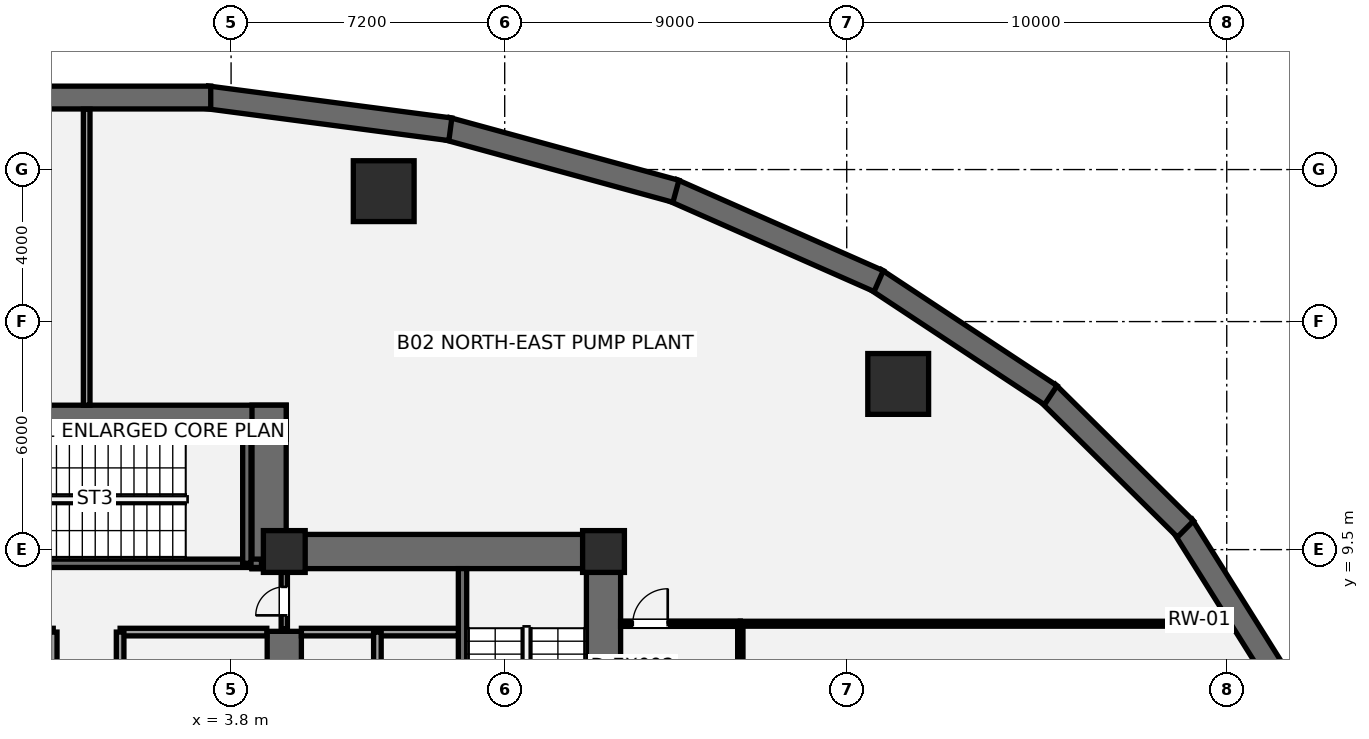
"""IFC4 building model, lengths in metres.
Left out: names, types, materials, properties, quantities, classifications, styles, units other than length and angle.
Written with IfcOpenShell. Run it as: python <this file> out.ifc"""

import sys

from ifc_helpers import new_model, si_unit, direction, frame, frame_2d, origin, origin_2d, place, context, subcontext, project, spatial, rectangle, hollow_circle, extrude, element, fill, save


model = new_model("IFC4")
c1 = context("Model", 3, precision=1e-05, world=origin(), true_north=direction((0.0, 1.0)))
c2 = subcontext(c1, "Body", "Model", "MODEL_VIEW")
j1 = project(units=[si_unit("LENGTHUNIT", "METRE"), si_unit("PLANEANGLEUNIT", "RADIAN")], contexts=[c1])
p1 = place(None, origin())
s1 = spatial("IfcSite", under=j1, at=p1, CompositionType="ELEMENT")
p2 = place(p1, origin())
s2 = spatial("IfcBuilding", under=s1, at=p2, CompositionType="ELEMENT")
p3 = place(p2, frame((0.0, 0.0, -8.8)))
s3 = spatial("IfcBuildingStorey", under=s2, at=p3, CompositionType="ELEMENT", Elevation=-8.8)
p4 = place(p3, frame((31.341, 6.143, 0.0), z_axis=(0.0, 0.0, 1.0), x_axis=(-0.531244363113, 0.847218641592, 0.0)))
e1 = element("IfcWall", 1, at=p4, inside=s3, PredefinedType="USERDEFINED", context=c2, shape_type="SweptSolid", body=[
    extrude(rectangle(XDim=4.72, YDim=0.6, at=frame_2d((2.36, 0.0))), origin(), (0.0, 0.0, 1.0), 4.4),
])
p5 = place(p3, frame((28.914, 10.042, 0.0), z_axis=(0.0, 0.0, 1.0), x_axis=(-0.711105403666, 0.70308541791, 0.0)))
e2 = element("IfcWall", 2, at=p5, inside=s3, PredefinedType="USERDEFINED", context=c2, shape_type="SweptSolid", body=[
    extrude(rectangle(XDim=5.114, YDim=0.6, at=frame_2d((2.557, 0.0))), origin(), (0.0, 0.0, 1.0), 4.4),
])
p6 = place(p3, frame((25.369, 13.563, 0.0), z_axis=(0.0, 0.0, 1.0), x_axis=(-0.834367518908, 0.551208529861, 0.0)))
e3 = element("IfcWall", 3, at=p6, inside=s3, PredefinedType="USERDEFINED", context=c2, shape_type="SweptSolid", body=[
    extrude(rectangle(XDim=5.542, YDim=0.6, at=frame_2d((2.771, 0.0))), origin(), (0.0, 0.0, 1.0), 4.4),
])
p7 = place(p3, frame((20.841, 16.565, 0.0), z_axis=(0.0, 0.0, 1.0), x_axis=(-0.91483072277, 0.403837527574, 0.0)))
e4 = element("IfcWall", 4, at=p7, inside=s3, PredefinedType="USERDEFINED", context=c2, shape_type="SweptSolid", body=[
    extrude(rectangle(XDim=5.94, YDim=0.6, at=frame_2d((2.97, 0.0))), origin(), (0.0, 0.0, 1.0), 4.4),
])
p8 = place(p3, frame((15.506, 18.929, 0.0), z_axis=(0.0, 0.0, 1.0), x_axis=(-0.964548276597, 0.263906464707, 0.0)))
e5 = element("IfcWall", 5, at=p8, inside=s3, PredefinedType="USERDEFINED", context=c2, shape_type="SweptSolid", body=[
    extrude(rectangle(XDim=6.257, YDim=0.6, at=frame_2d((3.128, 0.0))), origin(), (0.0, 0.0, 1.0), 4.4),
])
p9 = place(p3, frame((9.57, 20.56, 0.0), z_axis=(0.0, 0.0, 1.0), x_axis=(-0.991471782517, 0.130321542624, 0.0)))
e6 = element("IfcWall", 6, at=p9, inside=s3, PredefinedType="USERDEFINED", context=c2, shape_type="SweptSolid", body=[
    extrude(rectangle(XDim=6.459, YDim=0.6, at=frame_2d((3.23, 0.0))), origin(), (0.0, 0.0, 1.0), 4.4),
])
p10 = place(p3, frame((3.265, 21.395, 0.0), z_axis=(0.0, 0.0, 1.0), x_axis=(-1.0, 0.0, 0.0)))
e7 = element("IfcWall", 7, at=p10, inside=s3, PredefinedType="USERDEFINED", context=c2, shape_type="SweptSolid", body=[
    extrude(rectangle(XDim=6.529, YDim=0.6, at=frame_2d((3.265, 0.0))), origin(), (0.0, 0.0, 1.0), 4.4),
])
p11 = place(p3, frame((13.6, 0.95, 0.0), z_axis=(0.0, 0.0, 1.0), x_axis=(0.0, 1.0, 0.0)))
e8 = element("IfcWall", 8, at=p11, inside=s3, PredefinedType="SHEAR", context=c2, shape_type="SweptSolid", body=[
    extrude(rectangle(XDim=8.95, YDim=0.9, at=frame_2d((4.475, 0.0))), origin(), (0.0, 0.0, 1.0), 4.4),
])
p12 = place(p3, frame((4.35, 9.45, 0.0), z_axis=(0.0, 0.0, 1.0), x_axis=(1.0, 0.0, 0.0)))
e9 = element("IfcWall", 9, at=p12, inside=s3, PredefinedType="SHEAR", context=c2, shape_type="SweptSolid", body=[
    extrude(rectangle(XDim=9.7, YDim=0.9, at=frame_2d((4.85, 0.0))), origin(), (0.0, 0.0, 1.0), 4.4),
])
p13 = place(p3, frame((5.2, 5.35, 0.0), z_axis=(0.0, 0.0, 1.0), x_axis=(0.0, 1.0, 0.0)))
e10 = element("IfcWall", 10, at=p13, inside=s3, PredefinedType="SHEAR", context=c2, shape_type="SweptSolid", body=[
    extrude(rectangle(XDim=2.0, YDim=0.9, at=frame_2d((1.0, 0.0))), origin(), (0.0, 0.0, 1.0), 4.4),
])
p14 = place(p3, frame((9.89, 1.85, 0.0), z_axis=(0.0, 0.0, 1.0), x_axis=(0.0, 1.0, 0.0)))
e11 = element("IfcWall", 11, at=p14, inside=s3, PredefinedType="SHEAR", context=c2, shape_type="SweptSolid", body=[
    extrude(rectangle(XDim=7.15, YDim=0.22, at=frame_2d((3.575, 0.0))), origin(), (0.0, 0.0, 1.0), 4.4),
])
p15 = place(p3, frame((-5.25, 12.85, 0.0), z_axis=(0.0, 0.0, 1.0), x_axis=(1.0, 0.0, 0.0)))
e12 = element("IfcWall", 12, at=p15, inside=s3, PredefinedType="SHEAR", context=c2, shape_type="SweptSolid", body=[
    extrude(rectangle(XDim=10.5, YDim=0.9, at=frame_2d((5.25, 0.0))), origin(), (0.0, 0.0, 1.0), 4.4),
])
p16 = place(p3, frame((4.8, 9.0, 0.0), z_axis=(0.0, 0.0, 1.0), x_axis=(0.0, 1.0, 0.0)))
e13 = element("IfcWall", 13, at=p16, inside=s3, PredefinedType="SHEAR", context=c2, shape_type="SweptSolid", body=[
    extrude(rectangle(XDim=4.3, YDim=0.9, at=frame_2d((2.15, 0.0))), origin(), (0.0, 0.0, 1.0), 4.4),
])
p17 = place(p3, frame((-4.7, 9.14, 0.0), z_axis=(0.0, 0.0, 1.0), x_axis=(1.0, 0.0, 0.0)))
e14 = element("IfcWall", 14, at=p17, inside=s3, PredefinedType="SHEAR", context=c2, shape_type="SweptSolid", body=[
    extrude(rectangle(XDim=9.3, YDim=0.22, at=frame_2d((4.65, 0.0))), origin(), (0.0, 0.0, 1.0), 4.4),
])
p18 = place(p17, frame((1.15, 0.0, 0.0)))
e15 = element("IfcOpeningElement", 15, at=p18, cuts=e14, PredefinedType="OPENING", context=c2, shape_type="SweptSolid", body=[
    extrude(rectangle(XDim=1.05, YDim=2.15, at=frame_2d((0.525, 1.075))), frame((0.0, 0.12, 0.0), z_axis=(0.0, -1.0, 0.0), x_axis=(1.0, 0.0, 0.0)), (0.0, 0.0, 1.0), 0.24),
])
p19 = place(p3, frame((4.215, 9.14, 0.0), z_axis=(0.0, 0.0, 1.0), x_axis=(0.0, 1.0, 0.0)))
e16 = element("IfcWall", 16, at=p19, inside=s3, PredefinedType="SHEAR", context=c2, shape_type="SweptSolid", body=[
    extrude(rectangle(XDim=3.26, YDim=0.22, at=frame_2d((1.63, 0.0))), origin(), (0.0, 0.0, 1.0), 4.4),
])
for number, where, z_axis, x_axis in (
    (17, (5.2, 9.45, 0.0), (0.0, 0.0, 1.0), (1.0, 0.0, 0.0)),
    (18, (13.6, 9.45, 0.0), (0.0, 0.0, 1.0), (1.0, 0.0, 0.0)),
):
    element("IfcColumn", number, at=place(p3, frame(where, z_axis=z_axis, x_axis=x_axis)), inside=s3, PredefinedType="COLUMN", context=c2, shape_type="SweptSolid", body=[
        extrude(rectangle(XDim=1.1, YDim=1.1, at=origin_2d()), origin(), (0.0, 0.0, 1.0), 4.4),
    ])
for number, where, z_axis, x_axis in (
    (19, (21.354, 13.859, 0.0), (0.0, 0.0, 1.0), (1.0, 0.0, 0.0)),
    (20, (7.816, 18.932, 0.0), (0.0, 0.0, 1.0), (1.0, 0.0, 0.0)),
):
    element("IfcColumn", number, at=place(p3, frame(where, z_axis=z_axis, x_axis=x_axis)), inside=s3, PredefinedType="USERDEFINED", context=c2, shape_type="SweptSolid", body=[
        extrude(hollow_circle(Radius=0.8, WallThickness=0.06, at=origin_2d()), origin(), (0.0, 0.0, 1.0), 4.4),
    ])
p20 = place(p3, frame((5.65, 7.33, 0.0), z_axis=(0.0, 0.0, 1.0), x_axis=(1.0, 0.0, 0.0)))
e21 = element("IfcWall", 21, at=p20, inside=s3, PredefinedType="SOLIDWALL", context=c2, shape_type="SweptSolid", body=[
    extrude(rectangle(XDim=4.13, YDim=0.2, at=frame_2d((2.065, 0.0))), origin(), (0.0, 0.0, 1.0), 4.14),
])
p21 = place(p3, frame((7.65, 5.47, 0.0), z_axis=(0.0, 0.0, 1.0), x_axis=(0.0, 1.0, 0.0)))
e22 = element("IfcWall", 22, at=p21, inside=s3, PredefinedType="SOLIDWALL", context=c2, shape_type="SweptSolid", body=[
    extrude(rectangle(XDim=1.86, YDim=0.2, at=frame_2d((0.93, 0.0))), origin(), (0.0, 0.0, 1.0), 4.14),
])
for number, where, z_axis, x_axis in (
    (23, (-4.74, 7.33, 0.0), (0.0, 0.0, 1.0), (1.0, 0.0, 0.0)),
    (24, (0.88, 7.33, 0.0), (0.0, 0.0, 1.0), (1.0, 0.0, 0.0)),
):
    element("IfcWall", number, at=place(p3, frame(where, z_axis=z_axis, x_axis=x_axis)), inside=s3, PredefinedType="SOLIDWALL", context=c2, shape_type="SweptSolid", body=[
        extrude(rectangle(XDim=3.86, YDim=0.2, at=frame_2d((1.93, 0.0))), origin(), (0.0, 0.0, 1.0), 4.14),
    ])
for number, where, z_axis, x_axis in (
    (25, (-0.88, 5.52, 0.0), (0.0, 0.0, 1.0), (0.0, 1.0, 0.0)),
    (26, (0.88, 5.52, 0.0), (0.0, 0.0, 1.0), (0.0, 1.0, 0.0)),
):
    element("IfcWall", number, at=place(p3, frame(where, z_axis=z_axis, x_axis=x_axis)), inside=s3, PredefinedType="SOLIDWALL", context=c2, shape_type="SweptSolid", body=[
        extrude(rectangle(XDim=1.81, YDim=0.2, at=frame_2d((0.905, 0.0))), origin(), (0.0, 0.0, 1.0), 4.14),
    ])
p22 = place(p3, frame((5.2, 7.42, 0.0), z_axis=(0.0, 0.0, 1.0), x_axis=(0.0, 1.0, 0.0)))
e27 = element("IfcWall", 27, at=p22, inside=s3, PredefinedType="PARTITIONING", context=c2, shape_type="SweptSolid", body=[
    extrude(rectangle(XDim=1.58, YDim=0.165, at=frame_2d((0.79, 0.0))), origin(), (0.0, 0.0, 1.0), 4.14),
])
p23 = place(p22, frame((0.35, 0.0, 0.0)))
e28 = element("IfcOpeningElement", 28, at=p23, cuts=e27, PredefinedType="OPENING", context=c2, shape_type="SweptSolid", body=[
    extrude(rectangle(XDim=0.75, YDim=2.1, at=frame_2d((0.375, 1.05))), frame((0.0, 0.093, 0.0), z_axis=(0.0, -1.0, 0.0), x_axis=(1.0, 0.0, 0.0)), (0.0, 0.0, 1.0), 0.185),
])
p24 = place(p3, frame((17.2, -17.836, 0.0), z_axis=(0.0, 0.0, 1.0), x_axis=(0.0, 1.0, 0.0)))
e29 = element("IfcWall", 29, at=p24, inside=s3, PredefinedType="PARTITIONING", context=c2, shape_type="SweptSolid", body=[
    extrude(rectangle(XDim=25.386, YDim=0.14, at=frame_2d((12.693, 0.0))), origin(), (0.0, 0.0, 1.0), 3.508),
])
p25 = place(p24, frame((15.036, 0.0, 0.0)))
e30 = element("IfcOpeningElement", 30, at=p25, cuts=e29, PredefinedType="OPENING", context=c2, shape_type="SweptSolid", body=[
    extrude(rectangle(XDim=0.9, YDim=2.1, at=frame_2d((0.45, 1.05))), frame((0.0, 0.08, 0.0), z_axis=(0.0, -1.0, 0.0), x_axis=(1.0, 0.0, 0.0)), (0.0, 0.0, 1.0), 0.16),
])
p26 = place(p24, frame((21.911, 0.0, 0.0)))
e31 = element("IfcOpeningElement", 31, at=p26, cuts=e29, PredefinedType="OPENING", context=c2, shape_type="SweptSolid", body=[
    extrude(rectangle(XDim=0.9, YDim=2.1, at=frame_2d((0.45, 1.05))), frame((0.0, 0.08, 0.0), z_axis=(0.0, -1.0, 0.0), x_axis=(1.0, 0.0, 0.0)), (0.0, 0.0, 1.0), 0.16),
])
p27 = place(p3, frame((14.05, 7.55, 0.0), z_axis=(0.0, 0.0, 1.0), x_axis=(1.0, 0.0, 0.0)))
e32 = element("IfcWall", 32, at=p27, inside=s3, PredefinedType="PARTITIONING", context=c2, shape_type="SweptSolid", body=[
    extrude(rectangle(XDim=3.15, YDim=0.14, at=frame_2d((1.575, 0.0))), origin(), (0.0, 0.0, 1.0), 4.14),
])
p28 = place(p27, frame((0.32, 0.0, 0.0)))
e33 = element("IfcOpeningElement", 33, at=p28, cuts=e32, PredefinedType="OPENING", context=c2, shape_type="SweptSolid", body=[
    extrude(rectangle(XDim=0.92, YDim=2.15, at=frame_2d((0.46, 1.075))), frame((0.0, 0.08, 0.0), z_axis=(0.0, -1.0, 0.0), x_axis=(1.0, 0.0, 0.0)), (0.0, 0.0, 1.0), 0.16),
])
p29 = place(p3, frame((0.0, 13.3, 0.0), z_axis=(0.0, 0.0, 1.0), x_axis=(0.0, 1.0, 0.0)))
e34 = element("IfcWall", 34, at=p29, inside=s3, PredefinedType="PARTITIONING", context=c2, shape_type="SweptSolid", body=[
    extrude(rectangle(XDim=7.787, YDim=0.175, at=frame_2d((3.894, 0.0))), origin(), (0.0, 0.0, 1.0), 4.14),
])
p30 = place(p3, frame((17.2, 7.55, 0.0), z_axis=(0.0, 0.0, 1.0), x_axis=(1.0, 0.0, 0.0)))
e35 = element("IfcWall", 35, at=p30, inside=s3, PredefinedType="PARTITIONING", context=c2, shape_type="SweptSolid", body=[
    extrude(rectangle(XDim=12.895, YDim=0.13, at=frame_2d((6.448, 0.0))), origin(), (0.0, 0.0, 1.0), 3.118),
])
p31 = place(p23, origin())
e36 = element("IfcDoor", 36, at=p31, inside=s3, OperationType="SINGLE_SWING_LEFT", PredefinedType="DOOR", context=c2, shape_type="SweptSolid", body=[
    extrude(rectangle(XDim=0.75, YDim=2.1, at=frame_2d((0.375, 1.05))), frame((0.0, 0.025, 0.0), z_axis=(0.0, -1.0, 0.0), x_axis=(1.0, 0.0, 0.0)), (0.0, 0.0, 1.0), 0.05),
])
fill(e28, e36)
p32 = place(p28, origin())
e37 = element("IfcDoor", 37, at=p32, inside=s3, OperationType="SINGLE_SWING_RIGHT", PredefinedType="DOOR", context=c2, shape_type="SweptSolid", body=[
    extrude(rectangle(XDim=0.92, YDim=2.15, at=frame_2d((0.46, 1.075))), frame((0.0, 0.025, 0.0), z_axis=(0.0, -1.0, 0.0), x_axis=(1.0, 0.0, 0.0)), (0.0, 0.0, 1.0), 0.05),
])
fill(e33, e37)
save(model, sys.argv[1])
